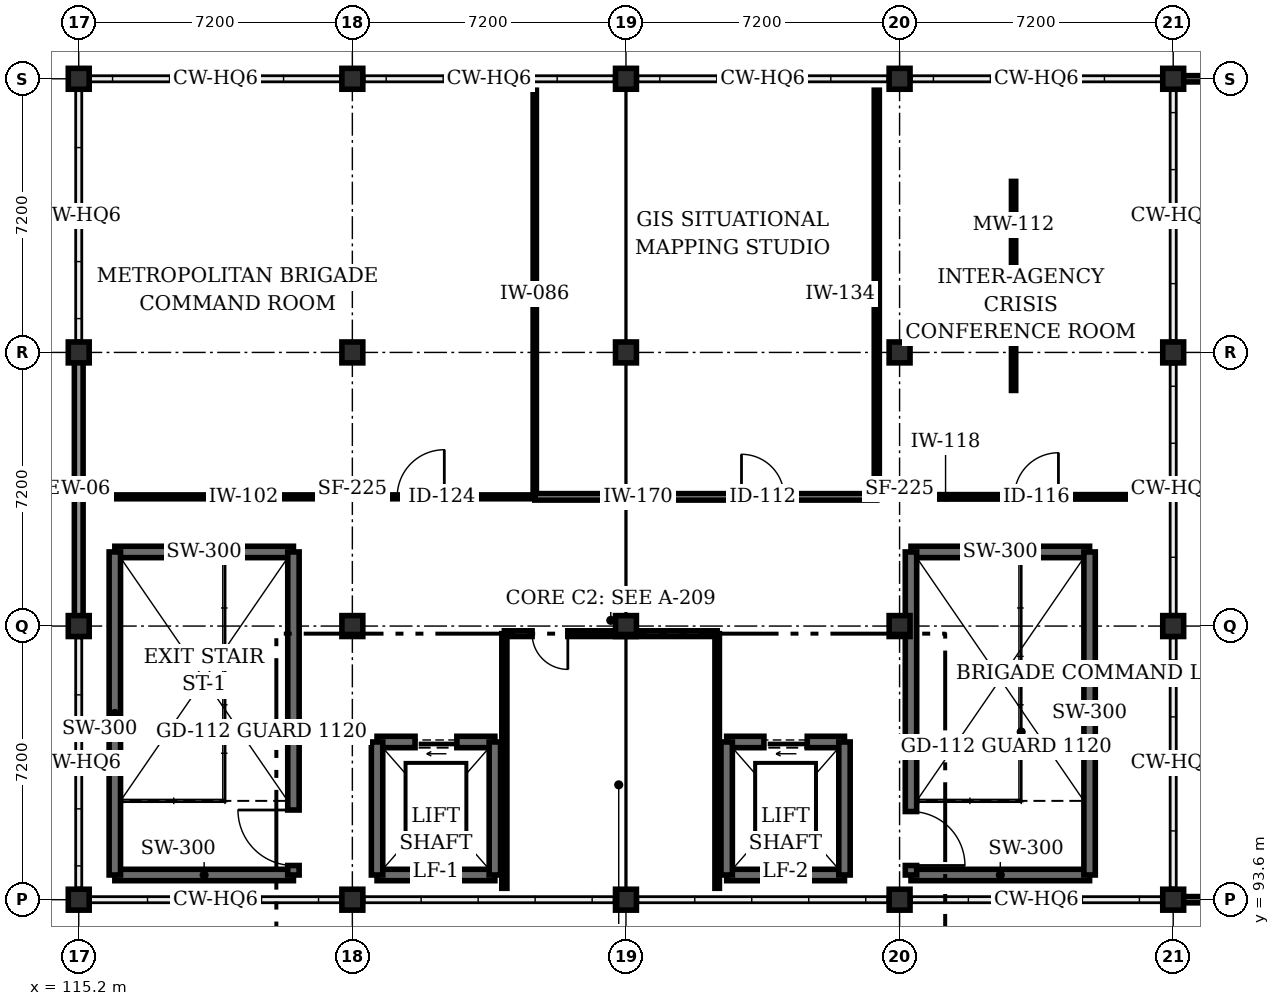
"""IFC4 building model, lengths in metres.
Left out: names, types, materials, properties, quantities, classifications, styles, units other than length and angle.
Written with IfcOpenShell. Run it as: python <this file> out.ifc"""

import sys

from ifc_helpers import new_model, si_unit, direction, frame, frame_2d, origin, origin_2d, place, context, subcontext, project, spatial, rectangle, extrude, element, fill, save


model = new_model("IFC4")
c1 = context("Model", 3, precision=1e-05, world=origin(), true_north=direction((0.0, 1.0)))
c2 = subcontext(c1, "Body", "Model", "MODEL_VIEW")
j1 = project(units=[si_unit("LENGTHUNIT", "METRE"), si_unit("PLANEANGLEUNIT", "RADIAN")], contexts=[c1])
p1 = place(None, origin())
s1 = spatial("IfcSite", under=j1, at=p1, CompositionType="ELEMENT")
p2 = place(p1, origin())
s2 = spatial("IfcBuilding", under=s1, at=p2, CompositionType="ELEMENT")
p3 = place(p2, frame((0.0, 0.0, 22.2)))
s3 = spatial("IfcBuildingStorey", under=s2, at=p3, CompositionType="ELEMENT", Elevation=22.2)
for number, where, z_axis, x_axis in (
    (1, (115.2, 93.6, 0.0), (0.0, 0.0, 1.0), (1.0, 0.0, 0.0)),
    (2, (115.2, 100.8, 0.0), (0.0, 0.0, 1.0), (1.0, 0.0, 0.0)),
    (3, (115.2, 108.0, 0.0), (0.0, 0.0, 1.0), (1.0, 0.0, 0.0)),
    (4, (115.2, 115.2, 0.0), (0.0, 0.0, 1.0), (1.0, 0.0, 0.0)),
    (5, (122.4, 93.6, 0.0), (0.0, 0.0, 1.0), (1.0, 0.0, 0.0)),
    (6, (122.4, 100.8, 0.0), (0.0, 0.0, 1.0), (1.0, 0.0, 0.0)),
    (7, (122.4, 108.0, 0.0), (0.0, 0.0, 1.0), (1.0, 0.0, 0.0)),
    (8, (122.4, 115.2, 0.0), (0.0, 0.0, 1.0), (1.0, 0.0, 0.0)),
    (9, (129.6, 93.6, 0.0), (0.0, 0.0, 1.0), (1.0, 0.0, 0.0)),
    (10, (129.6, 100.8, 0.0), (0.0, 0.0, 1.0), (1.0, 0.0, 0.0)),
    (11, (129.6, 108.0, 0.0), (0.0, 0.0, 1.0), (1.0, 0.0, 0.0)),
    (12, (129.6, 115.2, 0.0), (0.0, 0.0, 1.0), (1.0, 0.0, 0.0)),
    (13, (136.8, 93.6, 0.0), (0.0, 0.0, 1.0), (1.0, 0.0, 0.0)),
    (14, (136.8, 100.8, 0.0), (0.0, 0.0, 1.0), (1.0, 0.0, 0.0)),
    (15, (136.8, 108.0, 0.0), (0.0, 0.0, 1.0), (1.0, 0.0, 0.0)),
    (16, (136.8, 115.2, 0.0), (0.0, 0.0, 1.0), (1.0, 0.0, 0.0)),
    (17, (144.0, 93.6, 0.0), (0.0, 0.0, 1.0), (1.0, 0.0, 0.0)),
    (18, (144.0, 100.8, 0.0), (0.0, 0.0, 1.0), (1.0, 0.0, 0.0)),
    (19, (144.0, 108.0, 0.0), (0.0, 0.0, 1.0), (1.0, 0.0, 0.0)),
    (20, (144.0, 115.2, 0.0), (0.0, 0.0, 1.0), (1.0, 0.0, 0.0)),
):
    element("IfcColumn", number, at=place(p3, frame(where, z_axis=z_axis, x_axis=x_axis)), inside=s3, PredefinedType="COLUMN", context=c2, shape_type="SweptSolid", body=[
        extrude(rectangle(XDim=0.55, YDim=0.55, at=origin_2d()), origin(), (0.0, 0.0, 1.0), 4.2),
    ])
p4 = place(p3, frame((115.2, 108.0, 0.0), z_axis=(0.0, 0.0, 1.0), x_axis=(0.0, -1.0, 0.0)))
e21 = element("IfcWall", 21, at=p4, inside=s3, PredefinedType="STANDARD", context=c2, shape_type="SweptSolid", body=[
    extrude(rectangle(XDim=7.2, YDim=0.23, at=frame_2d((3.6, 0.0))), origin(), (0.0, 0.0, 1.0), 3.4),
])
for number, where, z_axis, x_axis in (
    (22, (144.0, 93.6, 0.0), (0.0, 0.0, 1.0), (1.0, 0.0, 0.0)),
    (23, (151.2, 115.2, 0.0), (0.0, 0.0, 1.0), (-1.0, 0.0, 0.0)),
):
    element("IfcWall", number, at=place(p3, frame(where, z_axis=z_axis, x_axis=x_axis)), inside=s3, PredefinedType="PARAPET", context=c2, shape_type="SweptSolid", body=[
        extrude(rectangle(XDim=7.2, YDim=0.165, at=frame_2d((3.6, 0.0))), origin(), (0.0, 0.0, 1.0), 1.15),
    ])
for number, where, z_axis, x_axis in (
    (24, (116.15, 94.25, 0.0), (0.0, 0.0, 1.0), (1.0, 0.0, 0.0)),
    (25, (120.85, 102.75, 0.0), (0.0, 0.0, 1.0), (-1.0, 0.0, 0.0)),
):
    element("IfcWall", number, at=place(p3, frame(where, z_axis=z_axis, x_axis=x_axis)), inside=s3, PredefinedType="SHEAR", context=c2, shape_type="SweptSolid", body=[
        extrude(rectangle(XDim=4.7, YDim=0.3, at=frame_2d((2.35, 0.0))), origin(), (0.0, 0.0, 1.0), 3.99),
    ])
p5 = place(p3, frame((116.15, 102.75, 0.0), z_axis=(0.0, 0.0, 1.0), x_axis=(0.0, -1.0, 0.0)))
e26 = element("IfcWall", 26, at=p5, inside=s3, PredefinedType="SHEAR", context=c2, shape_type="SweptSolid", body=[
    extrude(rectangle(XDim=8.5, YDim=0.3, at=frame_2d((4.25, 0.0))), origin(), (0.0, 0.0, 1.0), 3.99),
])
p6 = place(p3, frame((120.85, 94.25, 0.0), z_axis=(0.0, 0.0, 1.0), x_axis=(0.0, 1.0, 0.0)))
e27 = element("IfcWall", 27, at=p6, inside=s3, PredefinedType="SHEAR", context=c2, shape_type="SweptSolid", body=[
    extrude(rectangle(XDim=8.5, YDim=0.3, at=frame_2d((4.25, 0.0))), origin(), (0.0, 0.0, 1.0), 3.99),
])
p7 = place(p6, frame((0.25, 0.0, 0.0)))
e28 = element("IfcOpeningElement", 28, at=p7, cuts=e27, PredefinedType="OPENING", context=c2, shape_type="SweptSolid", body=[
    extrude(rectangle(XDim=1.46, YDim=2.24, at=frame_2d((0.73, 1.12))), frame((0.0, 0.16, 0.0), z_axis=(0.0, -1.0, 0.0), x_axis=(1.0, 0.0, 0.0)), (0.0, 0.0, 1.0), 0.32),
])
p8 = place(p3, frame((123.05, 94.25, 0.0), z_axis=(0.0, 0.0, 1.0), x_axis=(1.0, 0.0, 0.0)))
e29 = element("IfcWall", 29, at=p8, inside=s3, PredefinedType="SHEAR", context=c2, shape_type="SweptSolid", body=[
    extrude(rectangle(XDim=3.1, YDim=0.3, at=frame_2d((1.55, 0.0))), origin(), (0.0, 0.0, 1.0), 3.99),
])
p9 = place(p3, frame((126.15, 97.75, 0.0), z_axis=(0.0, 0.0, 1.0), x_axis=(-1.0, 0.0, 0.0)))
e30 = element("IfcWall", 30, at=p9, inside=s3, PredefinedType="SHEAR", context=c2, shape_type="SweptSolid", body=[
    extrude(rectangle(XDim=3.1, YDim=0.3, at=frame_2d((1.55, 0.0))), origin(), (0.0, 0.0, 1.0), 3.99),
])
p10 = place(p9, frame((1.0, 0.0, 0.0)))
e31 = element("IfcOpeningElement", 31, at=p10, cuts=e30, PredefinedType="OPENING", context=c2, shape_type="SweptSolid", body=[
    extrude(rectangle(XDim=1.1, YDim=2.22, at=frame_2d((0.55, 1.11))), frame((0.0, 0.16, 0.0), z_axis=(0.0, -1.0, 0.0), x_axis=(1.0, 0.0, 0.0)), (0.0, 0.0, 1.0), 0.32),
])
for number, where, z_axis, x_axis in (
    (32, (123.05, 97.75, 0.0), (0.0, 0.0, 1.0), (0.0, -1.0, 0.0)),
    (33, (126.15, 94.25, 0.0), (0.0, 0.0, 1.0), (0.0, 1.0, 0.0)),
):
    element("IfcWall", number, at=place(p3, frame(where, z_axis=z_axis, x_axis=x_axis)), inside=s3, PredefinedType="SHEAR", context=c2, shape_type="SweptSolid", body=[
        extrude(rectangle(XDim=3.5, YDim=0.3, at=frame_2d((1.75, 0.0))), origin(), (0.0, 0.0, 1.0), 3.99),
    ])
for number, where, z_axis, x_axis in (
    (34, (137.1, 94.25, 0.0), (0.0, 0.0, 1.0), (1.0, 0.0, 0.0)),
    (35, (141.8, 102.75, 0.0), (0.0, 0.0, 1.0), (-1.0, 0.0, 0.0)),
):
    element("IfcWall", number, at=place(p3, frame(where, z_axis=z_axis, x_axis=x_axis)), inside=s3, PredefinedType="SHEAR", context=c2, shape_type="SweptSolid", body=[
        extrude(rectangle(XDim=4.7, YDim=0.3, at=frame_2d((2.35, 0.0))), origin(), (0.0, 0.0, 1.0), 3.99),
    ])
p11 = place(p3, frame((137.1, 102.75, 0.0), z_axis=(0.0, 0.0, 1.0), x_axis=(0.0, -1.0, 0.0)))
e36 = element("IfcWall", 36, at=p11, inside=s3, PredefinedType="SHEAR", context=c2, shape_type="SweptSolid", body=[
    extrude(rectangle(XDim=8.5, YDim=0.3, at=frame_2d((4.25, 0.0))), origin(), (0.0, 0.0, 1.0), 3.99),
])
p12 = place(p11, frame((6.83, 0.0, 0.0)))
e37 = element("IfcOpeningElement", 37, at=p12, cuts=e36, PredefinedType="OPENING", context=c2, shape_type="SweptSolid", body=[
    extrude(rectangle(XDim=1.42, YDim=2.22, at=frame_2d((0.71, 1.11))), frame((0.0, 0.16, 0.0), z_axis=(0.0, -1.0, 0.0), x_axis=(1.0, 0.0, 0.0)), (0.0, 0.0, 1.0), 0.32),
])
p13 = place(p3, frame((141.8, 94.25, 0.0), z_axis=(0.0, 0.0, 1.0), x_axis=(0.0, 1.0, 0.0)))
e38 = element("IfcWall", 38, at=p13, inside=s3, PredefinedType="SHEAR", context=c2, shape_type="SweptSolid", body=[
    extrude(rectangle(XDim=8.5, YDim=0.3, at=frame_2d((4.25, 0.0))), origin(), (0.0, 0.0, 1.0), 3.99),
])
p14 = place(p3, frame((132.25, 94.25, 0.0), z_axis=(0.0, 0.0, 1.0), x_axis=(1.0, 0.0, 0.0)))
e39 = element("IfcWall", 39, at=p14, inside=s3, PredefinedType="SHEAR", context=c2, shape_type="SweptSolid", body=[
    extrude(rectangle(XDim=3.1, YDim=0.3, at=frame_2d((1.55, 0.0))), origin(), (0.0, 0.0, 1.0), 3.99),
])
p15 = place(p3, frame((135.35, 97.75, 0.0), z_axis=(0.0, 0.0, 1.0), x_axis=(-1.0, 0.0, 0.0)))
e40 = element("IfcWall", 40, at=p15, inside=s3, PredefinedType="SHEAR", context=c2, shape_type="SweptSolid", body=[
    extrude(rectangle(XDim=3.1, YDim=0.3, at=frame_2d((1.55, 0.0))), origin(), (0.0, 0.0, 1.0), 3.99),
])
p16 = place(p15, frame((0.98, 0.0, 0.0)))
e41 = element("IfcOpeningElement", 41, at=p16, cuts=e40, PredefinedType="OPENING", context=c2, shape_type="SweptSolid", body=[
    extrude(rectangle(XDim=1.14, YDim=2.24, at=frame_2d((0.57, 1.12))), frame((0.0, 0.16, 0.0), z_axis=(0.0, -1.0, 0.0), x_axis=(1.0, 0.0, 0.0)), (0.0, 0.0, 1.0), 0.32),
])
for number, where, z_axis, x_axis in (
    (42, (132.25, 97.75, 0.0), (0.0, 0.0, 1.0), (0.0, -1.0, 0.0)),
    (43, (135.35, 94.25, 0.0), (0.0, 0.0, 1.0), (0.0, 1.0, 0.0)),
):
    element("IfcWall", number, at=place(p3, frame(where, z_axis=z_axis, x_axis=x_axis)), inside=s3, PredefinedType="SHEAR", context=c2, shape_type="SweptSolid", body=[
        extrude(rectangle(XDim=3.5, YDim=0.3, at=frame_2d((1.75, 0.0))), origin(), (0.0, 0.0, 1.0), 3.99),
    ])
p17 = place(p3, frame((132.0, 100.6, 0.0), z_axis=(0.0, 0.0, 1.0), x_axis=(-1.0, 0.0, 0.0)))
e44 = element("IfcWall", 44, at=p17, inside=s3, PredefinedType="STANDARD", context=c2, shape_type="SweptSolid", body=[
    extrude(rectangle(XDim=5.6, YDim=0.15, at=frame_2d((2.8, 0.0))), origin(), (0.0, 0.0, 1.0), 3.457),
])
p18 = place(p17, frame((3.93, 0.0, 0.0)))
e45 = element("IfcOpeningElement", 45, at=p18, cuts=e44, PredefinedType="OPENING", context=c2, shape_type="SweptSolid", body=[
    extrude(rectangle(XDim=0.94, YDim=2.12, at=frame_2d((0.47, 1.06))), frame((0.0, 0.085, 0.0), z_axis=(0.0, -1.0, 0.0), x_axis=(1.0, 0.0, 0.0)), (0.0, 0.0, 1.0), 0.17),
])
p19 = place(p3, frame((126.4, 100.6, 0.0), z_axis=(0.0, 0.0, 1.0), x_axis=(0.0, -1.0, 0.0)))
e46 = element("IfcWall", 46, at=p19, inside=s3, PredefinedType="STANDARD", context=c2, shape_type="SweptSolid", body=[
    extrude(rectangle(XDim=6.7, YDim=0.134, at=frame_2d((3.35, 0.0))), origin(), (0.0, 0.0, 1.0), 3.457),
])
p20 = place(p3, frame((132.0, 93.9, 0.0), z_axis=(0.0, 0.0, 1.0), x_axis=(0.0, 1.0, 0.0)))
e47 = element("IfcWall", 47, at=p20, inside=s3, PredefinedType="STANDARD", context=c2, shape_type="SweptSolid", body=[
    extrude(rectangle(XDim=6.7, YDim=0.118, at=frame_2d((3.35, 0.0))), origin(), (0.0, 0.0, 1.0), 3.457),
])
p21 = place(p3, frame((115.5, 104.2, 0.0), z_axis=(0.0, 0.0, 1.0), x_axis=(1.0, 0.0, 0.0)))
e48 = element("IfcWall", 48, at=p21, inside=s3, PredefinedType="STANDARD", context=c2, shape_type="SweptSolid", body=[
    extrude(rectangle(XDim=11.7, YDim=0.102, at=frame_2d((5.85, 0.0))), origin(), (0.0, 0.0, 1.0), 3.457),
])
p22 = place(p21, frame((8.08, 0.0, 0.0)))
e49 = element("IfcOpeningElement", 49, at=p22, cuts=e48, PredefinedType="OPENING", context=c2, shape_type="SweptSolid", body=[
    extrude(rectangle(XDim=1.24, YDim=2.24, at=frame_2d((0.62, 1.12))), frame((0.0, 0.061, 0.0), z_axis=(0.0, -1.0, 0.0), x_axis=(1.0, 0.0, 0.0)), (0.0, 0.0, 1.0), 0.122),
])
p23 = place(p3, frame((127.2, 104.2, 0.0), z_axis=(0.0, 0.0, 1.0), x_axis=(0.0, 1.0, 0.0)))
e50 = element("IfcWall", 50, at=p23, inside=s3, PredefinedType="STANDARD", context=c2, shape_type="SweptSolid", body=[
    extrude(rectangle(XDim=10.7, YDim=0.086, at=frame_2d((5.35, 0.0))), origin(), (0.0, 0.0, 1.0), 3.457),
])
p24 = place(p3, frame((127.2, 104.2, 0.0), z_axis=(0.0, 0.0, 1.0), x_axis=(1.0, 0.0, 0.0)))
e51 = element("IfcWall", 51, at=p24, inside=s3, PredefinedType="STANDARD", context=c2, shape_type="SweptSolid", body=[
    extrude(rectangle(XDim=9.0, YDim=0.17, at=frame_2d((4.5, 0.0))), origin(), (0.0, 0.0, 1.0), 3.457),
])
p25 = place(p24, frame((5.44, 0.0, 0.0)))
e52 = element("IfcOpeningElement", 52, at=p25, cuts=e51, PredefinedType="OPENING", context=c2, shape_type="SweptSolid", body=[
    extrude(rectangle(XDim=1.12, YDim=2.2, at=frame_2d((0.56, 1.1))), frame((0.0, 0.095, 0.0), z_axis=(0.0, -1.0, 0.0), x_axis=(1.0, 0.0, 0.0)), (0.0, 0.0, 1.0), 0.19),
])
p26 = place(p3, frame((136.2, 104.2, 0.0), z_axis=(0.0, 0.0, 1.0), x_axis=(0.0, 1.0, 0.0)))
e53 = element("IfcWall", 53, at=p26, inside=s3, PredefinedType="STANDARD", context=c2, shape_type="SweptSolid", body=[
    extrude(rectangle(XDim=10.7, YDim=0.134, at=frame_2d((5.35, 0.0))), origin(), (0.0, 0.0, 1.0), 3.457),
])
p27 = place(p3, frame((136.2, 104.2, 0.0), z_axis=(0.0, 0.0, 1.0), x_axis=(1.0, 0.0, 0.0)))
e54 = element("IfcWall", 54, at=p27, inside=s3, PredefinedType="STANDARD", context=c2, shape_type="SweptSolid", body=[
    extrude(rectangle(XDim=7.5, YDim=0.118, at=frame_2d((3.75, 0.0))), origin(), (0.0, 0.0, 1.0), 3.457),
])
p28 = place(p27, frame((3.62, 0.0, 0.0)))
e55 = element("IfcOpeningElement", 55, at=p28, cuts=e54, PredefinedType="OPENING", context=c2, shape_type="SweptSolid", body=[
    extrude(rectangle(XDim=1.16, YDim=2.22, at=frame_2d((0.58, 1.11))), frame((0.0, 0.069, 0.0), z_axis=(0.0, -1.0, 0.0), x_axis=(1.0, 0.0, 0.0)), (0.0, 0.0, 1.0), 0.138),
])
p29 = place(p3, frame((139.8, 107.0, 0.0), z_axis=(0.0, 0.0, 1.0), x_axis=(0.0, 1.0, 0.0)))
e56 = element("IfcWall", 56, at=p29, inside=s3, PredefinedType="MOVABLE", context=c2, shape_type="SweptSolid", body=[
    extrude(rectangle(XDim=5.5, YDim=0.112, at=frame_2d((2.75, 0.0))), origin(), (0.0, 0.0, 1.0), 3.457),
])
p30 = place(p2, frame((0.0, 0.0, 26.4)))
p31 = place(p30, frame((0.0, 0.0, -0.21)))
p32 = place(p31, frame((123.5, 109.5, 0.16)))
e57 = element("IfcWindow", 57, at=p32, inside=s3, PartitioningType="SINGLE_PANEL", PredefinedType="SKYLIGHT", context=c2, shape_type="SweptSolid", body=[
    extrude(rectangle(XDim=2.04, YDim=1.4, at=origin_2d()), origin(), (0.0, 0.0, 1.0), 0.05),
])
p33 = place(p31, frame((127.2, 109.5, 0.16)))
e58 = element("IfcWindow", 58, at=p33, inside=s3, PartitioningType="SINGLE_PANEL", PredefinedType="SKYLIGHT", context=c2, shape_type="SweptSolid", body=[
    extrude(rectangle(XDim=1.92, YDim=1.34, at=origin_2d()), origin(), (0.0, 0.0, 1.0), 0.05),
])
p34 = place(p30, frame((0.0, 0.0, -0.21)))
p35 = place(p34, frame((132.5, 109.5, 0.16)))
e59 = element("IfcWindow", 59, at=p35, inside=s3, PartitioningType="SINGLE_PANEL", PredefinedType="SKYLIGHT", context=c2, shape_type="SweptSolid", body=[
    extrude(rectangle(XDim=1.8, YDim=1.28, at=origin_2d()), origin(), (0.0, 0.0, 1.0), 0.05),
])
p36 = place(p34, frame((140.0, 109.5, 0.16)))
e60 = element("IfcWindow", 60, at=p36, inside=s3, PartitioningType="SINGLE_PANEL", PredefinedType="SKYLIGHT", context=c2, shape_type="SweptSolid", body=[
    extrude(rectangle(XDim=1.68, YDim=1.22, at=origin_2d()), origin(), (0.0, 0.0, 1.0), 0.05),
])
p37 = place(p7, origin())
e61 = element("IfcDoor", 61, at=p37, inside=s3, OperationType="SINGLE_SWING_RIGHT", PredefinedType="DOOR", context=c2, shape_type="SweptSolid", body=[
    extrude(rectangle(XDim=1.46, YDim=2.24, at=frame_2d((0.73, 1.12))), frame((0.0, 0.025, 0.0), z_axis=(0.0, -1.0, 0.0), x_axis=(1.0, 0.0, 0.0)), (0.0, 0.0, 1.0), 0.05),
])
fill(e28, e61)
p38 = place(p10, origin())
e62 = element("IfcDoor", 62, at=p38, inside=s3, OperationType="SLIDING_TO_LEFT", PredefinedType="DOOR", context=c2, shape_type="SweptSolid", body=[
    extrude(rectangle(XDim=1.1, YDim=2.22, at=frame_2d((0.55, 1.11))), frame((0.0, 0.025, 0.0), z_axis=(0.0, -1.0, 0.0), x_axis=(1.0, 0.0, 0.0)), (0.0, 0.0, 1.0), 0.05),
])
fill(e31, e62)
p39 = place(p12, origin())
e63 = element("IfcDoor", 63, at=p39, inside=s3, OperationType="SINGLE_SWING_RIGHT", PredefinedType="DOOR", context=c2, shape_type="SweptSolid", body=[
    extrude(rectangle(XDim=1.42, YDim=2.22, at=frame_2d((0.71, 1.11))), frame((0.0, 0.025, 0.0), z_axis=(0.0, -1.0, 0.0), x_axis=(1.0, 0.0, 0.0)), (0.0, 0.0, 1.0), 0.05),
])
fill(e37, e63)
p40 = place(p16, origin())
e64 = element("IfcDoor", 64, at=p40, inside=s3, OperationType="SLIDING_TO_LEFT", PredefinedType="DOOR", context=c2, shape_type="SweptSolid", body=[
    extrude(rectangle(XDim=1.14, YDim=2.24, at=frame_2d((0.57, 1.12))), frame((0.0, 0.025, 0.0), z_axis=(0.0, -1.0, 0.0), x_axis=(1.0, 0.0, 0.0)), (0.0, 0.0, 1.0), 0.05),
])
fill(e41, e64)
p41 = place(p18, origin())
e65 = element("IfcDoor", 65, at=p41, inside=s3, OperationType="SINGLE_SWING_LEFT", PredefinedType="DOOR", context=c2, shape_type="SweptSolid", body=[
    extrude(rectangle(XDim=0.94, YDim=2.12, at=frame_2d((0.47, 1.06))), frame((0.0, 0.025, 0.0), z_axis=(0.0, -1.0, 0.0), x_axis=(1.0, 0.0, 0.0)), (0.0, 0.0, 1.0), 0.05),
])
fill(e45, e65)
p42 = place(p22, origin())
e66 = element("IfcDoor", 66, at=p42, inside=s3, OperationType="SINGLE_SWING_RIGHT", PredefinedType="DOOR", context=c2, shape_type="SweptSolid", body=[
    extrude(rectangle(XDim=1.24, YDim=2.24, at=frame_2d((0.62, 1.12))), frame((0.0, 0.025, 0.0), z_axis=(0.0, -1.0, 0.0), x_axis=(1.0, 0.0, 0.0)), (0.0, 0.0, 1.0), 0.05),
])
fill(e49, e66)
p43 = place(p25, origin())
e67 = element("IfcDoor", 67, at=p43, inside=s3, OperationType="SINGLE_SWING_LEFT", PredefinedType="DOOR", context=c2, shape_type="SweptSolid", body=[
    extrude(rectangle(XDim=1.12, YDim=2.2, at=frame_2d((0.56, 1.1))), frame((0.0, 0.025, 0.0), z_axis=(0.0, -1.0, 0.0), x_axis=(1.0, 0.0, 0.0)), (0.0, 0.0, 1.0), 0.05),
])
fill(e52, e67)
p44 = place(p28, origin())
e68 = element("IfcDoor", 68, at=p44, inside=s3, OperationType="SINGLE_SWING_RIGHT", PredefinedType="DOOR", context=c2, shape_type="SweptSolid", body=[
    extrude(rectangle(XDim=1.16, YDim=2.22, at=frame_2d((0.58, 1.11))), frame((0.0, 0.025, 0.0), z_axis=(0.0, -1.0, 0.0), x_axis=(1.0, 0.0, 0.0)), (0.0, 0.0, 1.0), 0.05),
])
fill(e55, e68)
save(model, sys.argv[1])
